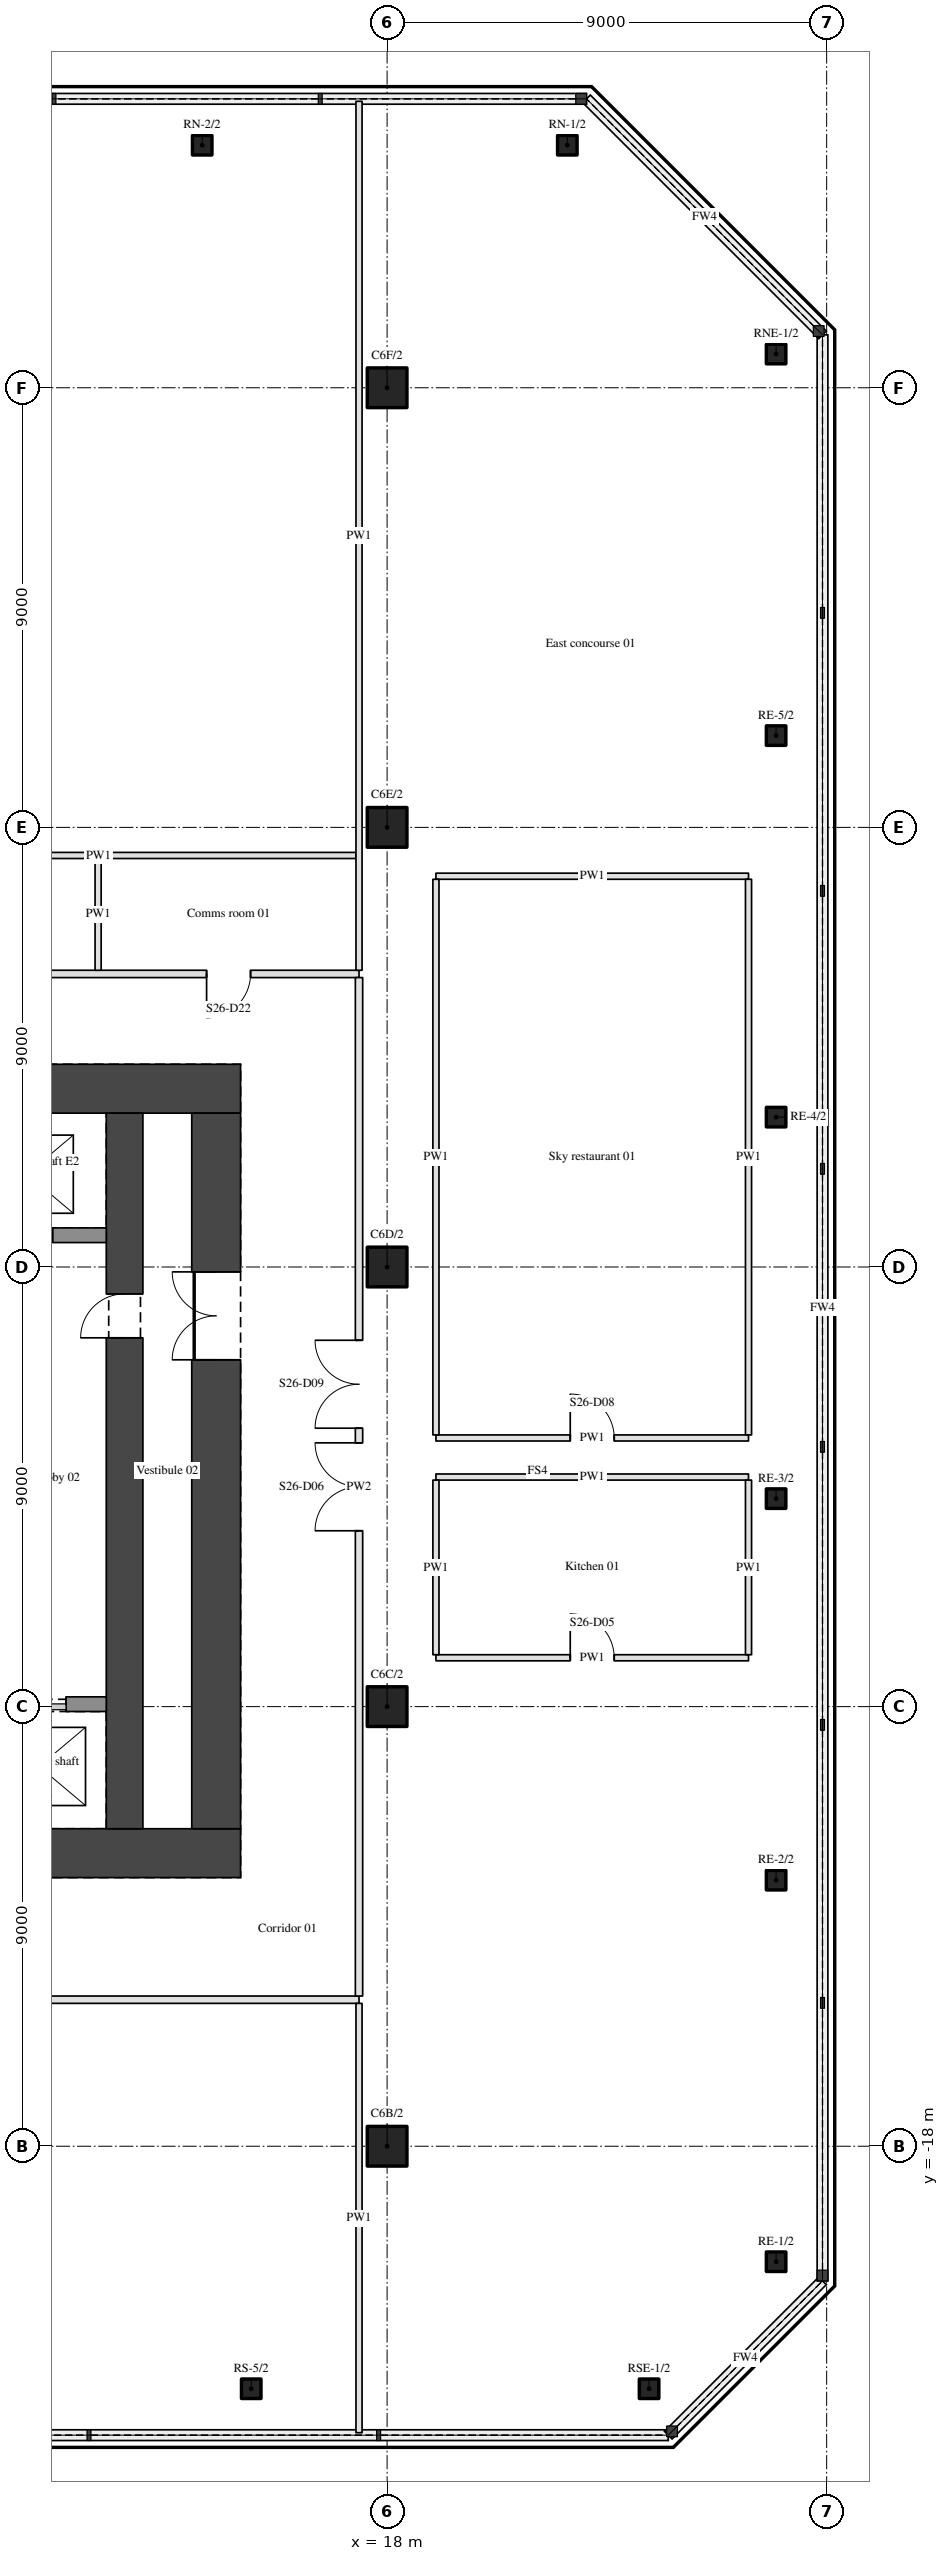
"""IFC4 building model, lengths in metres.
Left out: names, types, materials, properties, quantities, classifications, styles, units other than length and angle.
Written with IfcOpenShell. Run it as: python <this file> out.ifc"""

import sys

from ifc_helpers import new_model, si_unit, direction, frame, frame_2d, origin, origin_2d, place, context, subcontext, project, spatial, rectangle, hollow_rectangle, hollow_circle, extrude, element, fill, save


model = new_model("IFC4")
c1 = context("Model", 3, precision=1e-05, world=origin(), true_north=direction((0.0, 1.0)))
c2 = subcontext(c1, "Body", "Model", "MODEL_VIEW")
j1 = project(units=[si_unit("LENGTHUNIT", "METRE"), si_unit("PLANEANGLEUNIT", "RADIAN")], contexts=[c1])
p1 = place(None, origin())
s1 = spatial("IfcSite", under=j1, at=p1, CompositionType="ELEMENT")
p2 = place(p1, origin())
s2 = spatial("IfcBuilding", under=s1, at=p2, CompositionType="ELEMENT")
p3 = place(p2, frame((0.0, 0.0, 108.9)))
s3 = spatial("IfcBuildingStorey", under=s2, at=p3, CompositionType="ELEMENT", Elevation=108.9)
for number, where, z_axis, x_axis in (
    (1, (18.0, -18.0, 0.0), (0.0, 0.0, 1.0), (1.0, 0.0, 0.0)),
    (2, (18.0, -9.0, 0.0), (0.0, 0.0, 1.0), (1.0, 0.0, 0.0)),
    (3, (18.0, 0.0, 0.0), (0.0, 0.0, 1.0), (1.0, 0.0, 0.0)),
    (4, (18.0, 9.0, 0.0), (0.0, 0.0, 1.0), (1.0, 0.0, 0.0)),
    (5, (18.0, 18.0, 0.0), (0.0, 0.0, 1.0), (1.0, 0.0, 0.0)),
):
    element("IfcColumn", number, at=place(p3, frame(where, z_axis=z_axis, x_axis=x_axis)), inside=s3, PredefinedType="COLUMN", context=c2, shape_type="SweptSolid", body=[
        extrude(hollow_circle(Radius=0.406, WallThickness=0.036, at=origin_2d()), origin(), (0.0, 0.0, 1.0), 5.4),
    ])
for number, where, z_axis, x_axis in (
    (6, (15.218, -22.965, 0.0), (0.0, 0.0, 1.0), (1.0, 0.0, 0.0)),
    (7, (23.364, -22.965, 0.0), (0.0, 0.0, 1.0), (1.0, 0.0, 0.0)),
    (8, (25.965, -20.364, 0.0), (0.0, 0.0, 1.0), (1.0, 0.0, 0.0)),
    (9, (25.965, -12.553, 0.0), (0.0, 0.0, 1.0), (1.0, 0.0, 0.0)),
    (10, (25.965, -4.742, 0.0), (0.0, 0.0, 1.0), (1.0, 0.0, 0.0)),
    (11, (25.965, 3.068, 0.0), (0.0, 0.0, 1.0), (1.0, 0.0, 0.0)),
    (12, (25.965, 10.879, 0.0), (0.0, 0.0, 1.0), (1.0, 0.0, 0.0)),
    (13, (25.965, 18.69, 0.0), (0.0, 0.0, 1.0), (1.0, 0.0, 0.0)),
    (14, (21.69, 22.965, 0.0), (0.0, 0.0, 1.0), (1.0, 0.0, 0.0)),
    (15, (14.214, 22.965, 0.0), (0.0, 0.0, 1.0), (1.0, 0.0, 0.0)),
):
    element("IfcColumn", number, at=place(p3, frame(where, z_axis=z_axis, x_axis=x_axis)), inside=s3, PredefinedType="COLUMN", context=c2, shape_type="SweptSolid", body=[
        extrude(hollow_rectangle(XDim=0.4, YDim=0.4, WallThickness=0.025, InnerFilletRadius=0.038, OuterFilletRadius=0.062, at=origin_2d()), origin(), (0.0, 0.0, 1.0), 5.4),
    ])
for number, where, z_axis, x_axis in (
    (16, (-15.0, -12.0, 0.0), (0.0, 0.0, 1.0), (1.0, 0.0, 0.0)),
    (17, (-15.0, 3.65, 0.0), (0.0, 0.0, 1.0), (1.0, 0.0, 0.0)),
):
    element("IfcWall", number, at=place(p3, frame(where, z_axis=z_axis, x_axis=x_axis)), inside=s3, PredefinedType="SHEAR", context=c2, shape_type="SweptSolid", body=[
        extrude(rectangle(XDim=30.0, YDim=1.0, at=frame_2d((15.0, 0.0))), origin(), (0.0, 0.0, 1.0), 5.4),
    ])
p4 = place(p3, frame((14.5, -11.5, 0.0), z_axis=(0.0, 0.0, 1.0), x_axis=(0.0, 1.0, 0.0)))
e18 = element("IfcWall", 18, at=p4, inside=s3, PredefinedType="SHEAR", context=c2, shape_type="SweptSolid", body=[
    extrude(rectangle(XDim=14.65, YDim=1.0, at=frame_2d((7.325, 0.0))), origin(), (0.0, 0.0, 1.0), 5.4),
])
p5 = place(p4, frame((9.6, 0.0, 0.0)))
e19 = element("IfcOpeningElement", 19, at=p5, cuts=e18, PredefinedType="OPENING", context=c2, shape_type="SweptSolid", body=[
    extrude(rectangle(XDim=1.8, YDim=2.1, at=frame_2d((0.9, 1.05))), frame((0.0, 0.51, 0.0), z_axis=(0.0, -1.0, 0.0), x_axis=(1.0, 0.0, 0.0)), (0.0, 0.0, 1.0), 1.02),
])
p6 = place(p3, frame((12.625, -11.5, 0.0), z_axis=(0.0, 0.0, 1.0), x_axis=(0.0, 1.0, 0.0)))
e20 = element("IfcWall", 20, at=p6, inside=s3, PredefinedType="SHEAR", context=c2, shape_type="SweptSolid", body=[
    extrude(rectangle(XDim=14.65, YDim=0.75, at=frame_2d((7.325, 0.0))), origin(), (0.0, 0.0, 1.0), 5.4),
])
p7 = place(p6, frame((10.05, 0.0, 0.0)))
e21 = element("IfcOpeningElement", 21, at=p7, cuts=e20, PredefinedType="OPENING", context=c2, shape_type="SweptSolid", body=[
    extrude(rectangle(XDim=0.9, YDim=2.1, at=frame_2d((0.45, 1.05))), frame((0.0, 0.385, 0.0), z_axis=(0.0, -1.0, 0.0), x_axis=(1.0, 0.0, 0.0)), (0.0, 0.0, 1.0), 0.77),
])
p8 = place(p3, frame((-17.425, -15.0, 0.0), z_axis=(0.0, 0.0, 1.0), x_axis=(1.0, 0.0, 0.0)))
e22 = element("IfcWall", 22, at=p8, inside=s3, PredefinedType="PARTITIONING", context=c2, shape_type="SweptSolid", body=[
    extrude(rectangle(XDim=34.85, YDim=0.15, at=frame_2d((17.425, 0.0))), origin(), (0.0, 0.0, 1.0), 4.46),
])
p9 = place(p8, frame((16.525, 0.0, 0.0)))
e23 = element("IfcOpeningElement", 23, at=p9, cuts=e22, PredefinedType="OPENING", context=c2, shape_type="SweptSolid", body=[
    extrude(rectangle(XDim=1.8, YDim=2.1, at=frame_2d((0.9, 1.05))), frame((0.0, 0.085, 0.0), z_axis=(0.0, -1.0, 0.0), x_axis=(1.0, 0.0, 0.0)), (0.0, 0.0, 1.0), 0.17),
])
p10 = place(p8, frame((18.625, 0.0, 0.0)))
e24 = element("IfcOpeningElement", 24, at=p10, cuts=e22, PredefinedType="OPENING", context=c2, shape_type="SweptSolid", body=[
    extrude(rectangle(XDim=1.8, YDim=2.1, at=frame_2d((0.9, 1.05))), frame((0.0, 0.085, 0.0), z_axis=(0.0, -1.0, 0.0), x_axis=(1.0, 0.0, 0.0)), (0.0, 0.0, 1.0), 0.17),
])
p11 = place(p3, frame((9.5, -8.95, 0.0), z_axis=(0.0, 0.0, 1.0), x_axis=(1.0, 0.0, 0.0)))
e25 = element("IfcWall", 25, at=p11, inside=s3, PredefinedType="SHEAR", context=c2, shape_type="SweptSolid", body=[
    extrude(rectangle(XDim=2.75, YDim=0.3, at=frame_2d((1.375, 0.0))), origin(), (0.0, 0.0, 1.0), 5.4),
])
p12 = place(p11, frame((0.825, 0.0, 0.0)))
e26 = element("IfcOpeningElement", 26, at=p12, cuts=e25, PredefinedType="OPENING", context=c2, shape_type="SweptSolid", body=[
    extrude(rectangle(XDim=1.1, YDim=2.1, at=frame_2d((0.55, 1.05))), frame((0.0, 0.16, 0.0), z_axis=(0.0, -1.0, 0.0), x_axis=(1.0, 0.0, 0.0)), (0.0, 0.0, 1.0), 0.32),
])
p13 = place(p3, frame((19.0, -8.0, 0.0), z_axis=(0.0, 0.0, 1.0), x_axis=(1.0, 0.0, 0.0)))
e27 = element("IfcWall", 27, at=p13, inside=s3, PredefinedType="PARTITIONING", context=c2, shape_type="SweptSolid", body=[
    extrude(rectangle(XDim=6.4, YDim=0.125, at=frame_2d((3.2, 0.0))), origin(), (0.0, 0.0, 1.0), 4.46),
])
p14 = place(p13, frame((2.75, 0.0, 0.0)))
e28 = element("IfcOpeningElement", 28, at=p14, cuts=e27, PredefinedType="OPENING", context=c2, shape_type="SweptSolid", body=[
    extrude(rectangle(XDim=0.9, YDim=2.1, at=frame_2d((0.45, 1.05))), frame((0.0, 0.073, 0.0), z_axis=(0.0, -1.0, 0.0), x_axis=(1.0, 0.0, 0.0)), (0.0, 0.0, 1.0), 0.145),
])
p15 = place(p3, frame((19.0, -4.3, 0.0), z_axis=(0.0, 0.0, 1.0), x_axis=(1.0, 0.0, 0.0)))
e29 = element("IfcWall", 29, at=p15, inside=s3, PredefinedType="PARTITIONING", context=c2, shape_type="SweptSolid", body=[
    extrude(rectangle(XDim=6.4, YDim=0.125, at=frame_2d((3.2, 0.0))), origin(), (0.0, 0.0, 1.0), 4.46),
])
p16 = place(p3, frame((19.0, -3.5, 0.0), z_axis=(0.0, 0.0, 1.0), x_axis=(1.0, 0.0, 0.0)))
e30 = element("IfcWall", 30, at=p16, inside=s3, PredefinedType="PARTITIONING", context=c2, shape_type="SweptSolid", body=[
    extrude(rectangle(XDim=6.4, YDim=0.125, at=frame_2d((3.2, 0.0))), origin(), (0.0, 0.0, 1.0), 4.46),
])
p17 = place(p16, frame((2.75, 0.0, 0.0)))
e31 = element("IfcOpeningElement", 31, at=p17, cuts=e30, PredefinedType="OPENING", context=c2, shape_type="SweptSolid", body=[
    extrude(rectangle(XDim=0.9, YDim=2.1, at=frame_2d((0.45, 1.05))), frame((0.0, 0.073, 0.0), z_axis=(0.0, -1.0, 0.0), x_axis=(1.0, 0.0, 0.0)), (0.0, 0.0, 1.0), 0.145),
])
p18 = place(p3, frame((12.25, 0.65, 0.0), z_axis=(0.0, 0.0, 1.0), x_axis=(-1.0, 0.0, 0.0)))
e32 = element("IfcWall", 32, at=p18, inside=s3, PredefinedType="SHEAR", context=c2, shape_type="SweptSolid", body=[
    extrude(rectangle(XDim=3.25, YDim=0.3, at=frame_2d((1.625, 0.0))), origin(), (0.0, 0.0, 1.0), 5.4),
])
p19 = place(p18, frame((1.1, 0.0, 0.0)))
e33 = element("IfcOpeningElement", 33, at=p19, cuts=e32, PredefinedType="OPENING", context=c2, shape_type="SweptSolid", body=[
    extrude(rectangle(XDim=1.1, YDim=2.1, at=frame_2d((0.55, 1.05))), frame((0.0, 0.16, 0.0), z_axis=(0.0, -1.0, 0.0), x_axis=(1.0, 0.0, 0.0)), (0.0, 0.0, 1.0), 0.32),
])
p20 = place(p3, frame((17.425, 6.0, 0.0), z_axis=(0.0, 0.0, 1.0), x_axis=(-1.0, 0.0, 0.0)))
e34 = element("IfcWall", 34, at=p20, inside=s3, PredefinedType="PARTITIONING", context=c2, shape_type="SweptSolid", body=[
    extrude(rectangle(XDim=17.975, YDim=0.15, at=frame_2d((8.988, 0.0))), origin(), (0.0, 0.0, 1.0), 4.46),
])
p21 = place(p20, frame((12.854, 0.0, 0.0)))
e35 = element("IfcOpeningElement", 35, at=p21, cuts=e34, PredefinedType="OPENING", context=c2, shape_type="SweptSolid", body=[
    extrude(rectangle(XDim=1.0, YDim=2.1, at=frame_2d((0.5, 1.05))), frame((0.0, 0.085, 0.0), z_axis=(0.0, -1.0, 0.0), x_axis=(1.0, 0.0, 0.0)), (0.0, 0.0, 1.0), 0.17),
])
p22 = place(p20, frame((16.5, 0.0, 0.0)))
e36 = element("IfcOpeningElement", 36, at=p22, cuts=e34, PredefinedType="OPENING", context=c2, shape_type="SweptSolid", body=[
    extrude(rectangle(XDim=1.0, YDim=2.1, at=frame_2d((0.5, 1.05))), frame((0.0, 0.085, 0.0), z_axis=(0.0, -1.0, 0.0), x_axis=(1.0, 0.0, 0.0)), (0.0, 0.0, 1.0), 0.17),
])
p23 = place(p20, frame((7.562, 0.0, 0.0)))
e37 = element("IfcOpeningElement", 37, at=p23, cuts=e34, PredefinedType="OPENING", context=c2, shape_type="SweptSolid", body=[
    extrude(rectangle(XDim=0.9, YDim=2.1, at=frame_2d((0.45, 1.05))), frame((0.0, 0.085, 0.0), z_axis=(0.0, -1.0, 0.0), x_axis=(1.0, 0.0, 0.0)), (0.0, 0.0, 1.0), 0.17),
])
p24 = place(p20, frame((2.221, 0.0, 0.0)))
e38 = element("IfcOpeningElement", 38, at=p24, cuts=e34, PredefinedType="OPENING", context=c2, shape_type="SweptSolid", body=[
    extrude(rectangle(XDim=0.9, YDim=2.1, at=frame_2d((0.45, 1.05))), frame((0.0, 0.085, 0.0), z_axis=(0.0, -1.0, 0.0), x_axis=(1.0, 0.0, 0.0)), (0.0, 0.0, 1.0), 0.17),
])
p25 = place(p3, frame((19.0, 8.0, 0.0), z_axis=(0.0, 0.0, 1.0), x_axis=(1.0, 0.0, 0.0)))
e39 = element("IfcWall", 39, at=p25, inside=s3, PredefinedType="PARTITIONING", context=c2, shape_type="SweptSolid", body=[
    extrude(rectangle(XDim=6.4, YDim=0.125, at=frame_2d((3.2, 0.0))), origin(), (0.0, 0.0, 1.0), 4.46),
])
p26 = place(p3, frame((6.817, 8.425, 0.0), z_axis=(0.0, 0.0, 1.0), x_axis=(1.0, 0.0, 0.0)))
e40 = element("IfcWall", 40, at=p26, inside=s3, PredefinedType="PARTITIONING", context=c2, shape_type="SweptSolid", body=[
    extrude(rectangle(XDim=10.546, YDim=0.125, at=frame_2d((5.273, 0.0))), origin(), (0.0, 0.0, 1.0), 4.46),
])
p27 = place(p3, frame((12.083, 6.075, 0.0), z_axis=(0.0, 0.0, 1.0), x_axis=(0.0, 1.0, 0.0)))
e41 = element("IfcWall", 41, at=p27, inside=s3, PredefinedType="PARTITIONING", context=c2, shape_type="SweptSolid", body=[
    extrude(rectangle(XDim=2.288, YDim=0.125, at=frame_2d((1.144, 0.0))), origin(), (0.0, 0.0, 1.0), 4.46),
])
p28 = place(p3, frame((17.425, -23.865, 0.0), z_axis=(0.0, 0.0, 1.0), x_axis=(0.0, 1.0, 0.0)))
e42 = element("IfcWall", 42, at=p28, inside=s3, PredefinedType="PARTITIONING", context=c2, shape_type="SweptSolid", body=[
    extrude(rectangle(XDim=8.79, YDim=0.125, at=frame_2d((4.395, 0.0))), origin(), (0.0, 0.0, 1.0), 4.46),
])
p29 = place(p3, frame((17.425, -14.925, 0.0), z_axis=(0.0, 0.0, 1.0), x_axis=(0.0, 1.0, 0.0)))
e43 = element("IfcWall", 43, at=p29, inside=s3, PredefinedType="PARTITIONING", context=c2, shape_type="SweptSolid", body=[
    extrude(rectangle(XDim=20.85, YDim=0.15, at=frame_2d((10.425, 0.0))), origin(), (0.0, 0.0, 1.0), 4.46),
])
p30 = place(p29, frame((9.525, 0.0, 0.0)))
e44 = element("IfcOpeningElement", 44, at=p30, cuts=e43, PredefinedType="OPENING", context=c2, shape_type="SweptSolid", body=[
    extrude(rectangle(XDim=1.8, YDim=2.1, at=frame_2d((0.9, 1.05))), frame((0.0, 0.085, 0.0), z_axis=(0.0, -1.0, 0.0), x_axis=(1.0, 0.0, 0.0)), (0.0, 0.0, 1.0), 0.17),
])
p31 = place(p29, frame((11.625, 0.0, 0.0)))
e45 = element("IfcOpeningElement", 45, at=p31, cuts=e43, PredefinedType="OPENING", context=c2, shape_type="SweptSolid", body=[
    extrude(rectangle(XDim=1.8, YDim=2.1, at=frame_2d((0.9, 1.05))), frame((0.0, 0.085, 0.0), z_axis=(0.0, -1.0, 0.0), x_axis=(1.0, 0.0, 0.0)), (0.0, 0.0, 1.0), 0.17),
])
p32 = place(p3, frame((17.425, 6.075, 0.0), z_axis=(0.0, 0.0, 1.0), x_axis=(0.0, 1.0, 0.0)))
e46 = element("IfcWall", 46, at=p32, inside=s3, PredefinedType="PARTITIONING", context=c2, shape_type="SweptSolid", body=[
    extrude(rectangle(XDim=17.79, YDim=0.125, at=frame_2d((8.895, 0.0))), origin(), (0.0, 0.0, 1.0), 4.46),
])
p33 = place(p3, frame((19.0, -7.938, 0.0), z_axis=(0.0, 0.0, 1.0), x_axis=(0.0, 1.0, 0.0)))
e47 = element("IfcWall", 47, at=p33, inside=s3, PredefinedType="PARTITIONING", context=c2, shape_type="SweptSolid", body=[
    extrude(rectangle(XDim=3.575, YDim=0.125, at=frame_2d((1.788, 0.0))), origin(), (0.0, 0.0, 1.0), 4.46),
])
p34 = place(p3, frame((19.0, -3.438, 0.0), z_axis=(0.0, 0.0, 1.0), x_axis=(0.0, 1.0, 0.0)))
e48 = element("IfcWall", 48, at=p34, inside=s3, PredefinedType="PARTITIONING", context=c2, shape_type="SweptSolid", body=[
    extrude(rectangle(XDim=11.375, YDim=0.125, at=frame_2d((5.688, 0.0))), origin(), (0.0, 0.0, 1.0), 4.46),
])
p35 = place(p3, frame((25.4, -7.938, 0.0), z_axis=(0.0, 0.0, 1.0), x_axis=(0.0, 1.0, 0.0)))
e49 = element("IfcWall", 49, at=p35, inside=s3, PredefinedType="PARTITIONING", context=c2, shape_type="SweptSolid", body=[
    extrude(rectangle(XDim=3.575, YDim=0.125, at=frame_2d((1.788, 0.0))), origin(), (0.0, 0.0, 1.0), 4.46),
])
p36 = place(p3, frame((25.4, -3.438, 0.0), z_axis=(0.0, 0.0, 1.0), x_axis=(0.0, 1.0, 0.0)))
e50 = element("IfcWall", 50, at=p36, inside=s3, PredefinedType="PARTITIONING", context=c2, shape_type="SweptSolid", body=[
    extrude(rectangle(XDim=11.375, YDim=0.125, at=frame_2d((5.688, 0.0))), origin(), (0.0, 0.0, 1.0), 4.46),
])
p37 = place(p30, origin())
e51 = element("IfcDoor", 51, at=p37, inside=s3, OperationType="DOUBLE_DOOR_SINGLE_SWING", PredefinedType="DOOR", context=c2, shape_type="SweptSolid", body=[
    extrude(rectangle(XDim=1.8, YDim=2.1, at=frame_2d((0.9, 1.05))), frame((0.0, 0.025, 0.0), z_axis=(0.0, -1.0, 0.0), x_axis=(1.0, 0.0, 0.0)), (0.0, 0.0, 1.0), 0.05),
])
fill(e44, e51)
p38 = place(p31, origin())
e52 = element("IfcDoor", 52, at=p38, inside=s3, OperationType="DOUBLE_DOOR_SINGLE_SWING", PredefinedType="DOOR", context=c2, shape_type="SweptSolid", body=[
    extrude(rectangle(XDim=1.8, YDim=2.1, at=frame_2d((0.9, 1.05))), frame((0.0, 0.025, 0.0), z_axis=(0.0, -1.0, 0.0), x_axis=(1.0, 0.0, 0.0)), (0.0, 0.0, 1.0), 0.05),
])
fill(e45, e52)
p39 = place(p5, origin())
e53 = element("IfcDoor", 53, at=p39, inside=s3, OperationType="DOUBLE_DOOR_SINGLE_SWING", PredefinedType="DOOR", context=c2, shape_type="SweptSolid", body=[
    extrude(rectangle(XDim=1.8, YDim=2.1, at=frame_2d((0.9, 1.05))), frame((0.0, 0.025, 0.0), z_axis=(0.0, -1.0, 0.0), x_axis=(1.0, 0.0, 0.0)), (0.0, 0.0, 1.0), 0.05),
])
fill(e19, e53)
p40 = place(p24, origin())
e54 = element("IfcDoor", 54, at=p40, inside=s3, OperationType="SINGLE_SWING_RIGHT", PredefinedType="DOOR", context=c2, shape_type="SweptSolid", body=[
    extrude(rectangle(XDim=0.9, YDim=2.1, at=frame_2d((0.45, 1.05))), frame((0.0, 0.025, 0.0), z_axis=(0.0, -1.0, 0.0), x_axis=(1.0, 0.0, 0.0)), (0.0, 0.0, 1.0), 0.05),
])
fill(e38, e54)
p41 = place(p14, origin())
e55 = element("IfcDoor", 55, at=p41, inside=s3, OperationType="SINGLE_SWING_LEFT", PredefinedType="DOOR", context=c2, shape_type="SweptSolid", body=[
    extrude(rectangle(XDim=0.9, YDim=2.1, at=frame_2d((0.45, 1.05))), frame((0.0, 0.025, 0.0), z_axis=(0.0, -1.0, 0.0), x_axis=(1.0, 0.0, 0.0)), (0.0, 0.0, 1.0), 0.05),
])
fill(e28, e55)
p42 = place(p17, origin())
e56 = element("IfcDoor", 56, at=p42, inside=s3, OperationType="SINGLE_SWING_LEFT", PredefinedType="DOOR", context=c2, shape_type="SweptSolid", body=[
    extrude(rectangle(XDim=0.9, YDim=2.1, at=frame_2d((0.45, 1.05))), frame((0.0, 0.025, 0.0), z_axis=(0.0, -1.0, 0.0), x_axis=(1.0, 0.0, 0.0)), (0.0, 0.0, 1.0), 0.05),
])
fill(e31, e56)
p43 = place(p7, origin())
e57 = element("IfcDoor", 57, at=p43, inside=s3, OperationType="SINGLE_SWING_LEFT", PredefinedType="DOOR", context=c2, shape_type="SweptSolid", body=[
    extrude(rectangle(XDim=0.9, YDim=2.1, at=frame_2d((0.45, 1.05))), frame((0.0, 0.025, 0.0), z_axis=(0.0, -1.0, 0.0), x_axis=(1.0, 0.0, 0.0)), (0.0, 0.0, 1.0), 0.05),
])
fill(e21, e57)
p44 = place(p19, origin())
e58 = element("IfcDoor", 58, at=p44, inside=s3, OperationType="DOUBLE_DOOR_SLIDING", PredefinedType="DOOR", context=c2, shape_type="SweptSolid", body=[
    extrude(rectangle(XDim=1.1, YDim=2.1, at=frame_2d((0.55, 1.05))), frame((0.0, 0.025, 0.0), z_axis=(0.0, -1.0, 0.0), x_axis=(1.0, 0.0, 0.0)), (0.0, 0.0, 1.0), 0.05),
])
fill(e33, e58)
p45 = place(p12, origin())
e59 = element("IfcDoor", 59, at=p45, inside=s3, OperationType="DOUBLE_DOOR_SLIDING", PredefinedType="DOOR", context=c2, shape_type="SweptSolid", body=[
    extrude(rectangle(XDim=1.1, YDim=2.1, at=frame_2d((0.55, 1.05))), frame((0.0, 0.025, 0.0), z_axis=(0.0, -1.0, 0.0), x_axis=(1.0, 0.0, 0.0)), (0.0, 0.0, 1.0), 0.05),
])
fill(e26, e59)
save(model, sys.argv[1])
